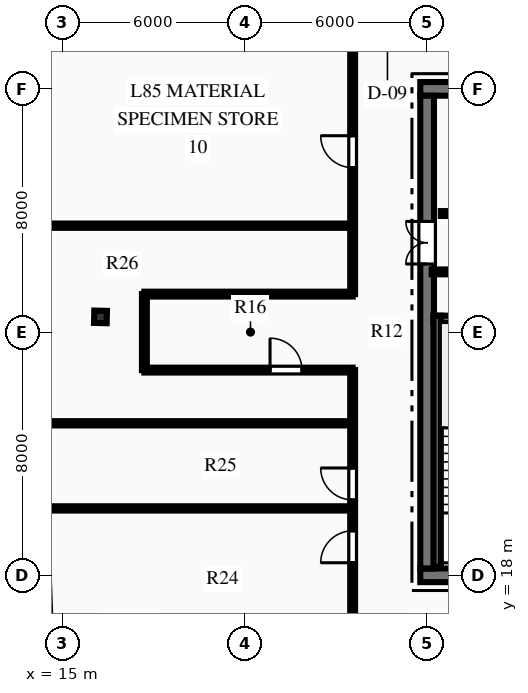
"""IFC4 building model, lengths in metres.
Left out: names, types, materials, properties, quantities, classifications, styles, units other than length and angle.
Written with IfcOpenShell. Run it as: python <this file> out.ifc"""

import sys

from ifc_helpers import new_model, si_unit, direction, frame, frame_2d, origin, origin_2d, place, context, subcontext, project, spatial, rectangle, i_section, extrude, element, fill, save


model = new_model("IFC4")
c1 = context("Model", 3, precision=1e-05, world=origin(), true_north=direction((0.0, 1.0)))
c2 = subcontext(c1, "Body", "Model", "MODEL_VIEW")
j1 = project(units=[si_unit("LENGTHUNIT", "METRE"), si_unit("PLANEANGLEUNIT", "RADIAN")], contexts=[c1])
p1 = place(None, origin())
s1 = spatial("IfcSite", under=j1, at=p1, CompositionType="ELEMENT")
p2 = place(p1, origin())
s2 = spatial("IfcBuilding", under=s1, at=p2, CompositionType="ELEMENT")
p3 = place(p2, frame((0.0, 0.0, 336.45)))
s3 = spatial("IfcBuildingStorey", under=s2, at=p3, CompositionType="ELEMENT", Elevation=336.45)
p4 = place(p3, frame((26.775, 18.0, 0.0), z_axis=(0.0, 0.0, 1.0), x_axis=(1.0, 0.0, 0.0)))
e1 = element("IfcWall", 1, at=p4, inside=s3, PredefinedType="SHEAR", context=c2, shape_type="SweptSolid", body=[
    extrude(rectangle(XDim=18.45, YDim=0.45, at=frame_2d((9.225, 0.0))), origin(), (0.0, 0.0, 1.0), 3.75),
])
p5 = place(p4, frame((7.325, 0.0, 0.0)))
e2 = element("IfcOpeningElement", 2, at=p5, cuts=e1, PredefinedType="OPENING", context=c2, shape_type="SweptSolid", body=[
    extrude(rectangle(XDim=1.1, YDim=2.15, at=frame_2d((0.55, 1.075))), frame((0.0, 0.235, 0.0), z_axis=(0.0, -1.0, 0.0), x_axis=(1.0, 0.0, 0.0)), (0.0, 0.0, 1.0), 0.47),
])
p6 = place(p4, frame((10.025, 0.0, 0.0)))
e3 = element("IfcOpeningElement", 3, at=p6, cuts=e1, PredefinedType="OPENING", context=c2, shape_type="SweptSolid", body=[
    extrude(rectangle(XDim=1.1, YDim=2.15, at=frame_2d((0.55, 1.075))), frame((0.0, 0.235, 0.0), z_axis=(0.0, -1.0, 0.0), x_axis=(1.0, 0.0, 0.0)), (0.0, 0.0, 1.0), 0.47),
])
p7 = place(p3, frame((26.775, 34.0, 0.0), z_axis=(0.0, 0.0, 1.0), x_axis=(1.0, 0.0, 0.0)))
e4 = element("IfcWall", 4, at=p7, inside=s3, PredefinedType="SHEAR", context=c2, shape_type="SweptSolid", body=[
    extrude(rectangle(XDim=18.45, YDim=0.45, at=frame_2d((9.225, 0.0))), origin(), (0.0, 0.0, 1.0), 3.75),
])
p8 = place(p3, frame((27.0, 18.225, 0.0), z_axis=(0.0, 0.0, 1.0), x_axis=(0.0, 1.0, 0.0)))
e5 = element("IfcWall", 5, at=p8, inside=s3, PredefinedType="SHEAR", context=c2, shape_type="SweptSolid", body=[
    extrude(rectangle(XDim=15.55, YDim=0.45, at=frame_2d((7.775, 0.0))), origin(), (0.0, 0.0, 1.0), 3.75),
])
p9 = place(p8, frame((10.015, 0.0, 0.0)))
e6 = element("IfcOpeningElement", 6, at=p9, cuts=e5, PredefinedType="OPENING", context=c2, shape_type="SweptSolid", body=[
    extrude(rectangle(XDim=1.4, YDim=2.2, at=frame_2d((0.7, 1.1))), frame((0.0, 0.235, 0.0), z_axis=(0.0, -1.0, 0.0), x_axis=(1.0, 0.0, 0.0)), (0.0, 0.0, 1.0), 0.47),
])
p10 = place(p3, frame((27.21, 26.42, 0.0), z_axis=(0.0, 0.0, 1.0), x_axis=(1.0, 0.0, 0.0)))
e7 = element("IfcWall", 7, at=p10, inside=s3, PredefinedType="SHEAR", context=c2, shape_type="SweptSolid", body=[
    extrude(rectangle(XDim=3.98, YDim=0.24, at=frame_2d((1.99, 0.0))), origin(), (0.0, 0.0, 1.0), 3.75),
])
p11 = place(p3, frame((27.33, 18.28, 0.0), z_axis=(0.0, 0.0, 1.0), x_axis=(0.0, 1.0, 0.0)))
e8 = element("IfcWall", 8, at=p11, inside=s3, PredefinedType="SHEAR", context=c2, shape_type="SweptSolid", body=[
    extrude(rectangle(XDim=8.26, YDim=0.24, at=frame_2d((4.13, 0.0))), origin(), (0.0, 0.0, 1.0), 3.75),
])
p12 = place(p3, frame((16.256, 26.5, 0.0), z_axis=(0.0, 0.0, 1.0), x_axis=(0.025304572866, 0.999679788028, 0.0)))
e9 = element("IfcColumn", 9, at=p12, inside=s3, PredefinedType="COLUMN", context=c2, shape_type="SweptSolid", body=[
    extrude(i_section(OverallWidth=0.406, OverallDepth=0.416, WebThickness=0.03, FlangeThickness=0.048, at=origin_2d()), origin(), (0.0, 0.0, 1.0), 3.75),
])
p13 = place(p3, frame((27.15, 27.98, 0.0), z_axis=(0.0, 0.0, 1.0), x_axis=(1.0, 0.0, 0.0)))
e10 = element("IfcWall", 10, at=p13, inside=s3, PredefinedType="PARTITIONING", context=c2, shape_type="SweptSolid", body=[
    extrude(rectangle(XDim=4.05, YDim=0.16, at=frame_2d((2.025, 0.0))), origin(), (0.0, 0.0, 1.0), 3.49),
])
p14 = place(p13, frame((1.625, 0.0, 0.0)))
e11 = element("IfcOpeningElement", 11, at=p14, cuts=e10, PredefinedType="OPENING", context=c2, shape_type="SweptSolid", body=[
    extrude(rectangle(XDim=0.95, YDim=2.15, at=frame_2d((0.475, 1.075))), frame((0.0, 0.09, 0.0), z_axis=(0.0, -1.0, 0.0), x_axis=(1.0, 0.0, 0.0)), (0.0, 0.0, 1.0), 0.18),
])
p15 = place(p3, frame((27.45, 29.9, 0.0), z_axis=(0.0, 0.0, 1.0), x_axis=(1.0, 0.0, 0.0)))
e12 = element("IfcWall", 12, at=p15, inside=s3, PredefinedType="PARTITIONING", context=c2, shape_type="SweptSolid", body=[
    extrude(rectangle(XDim=4.43, YDim=0.16, at=frame_2d((2.215, 0.0))), origin(), (0.0, 0.0, 1.0), 3.49),
])
p16 = place(p15, frame((1.675, 0.0, 0.0)))
e13 = element("IfcOpeningElement", 13, at=p16, cuts=e12, PredefinedType="OPENING", context=c2, shape_type="SweptSolid", body=[
    extrude(rectangle(XDim=0.95, YDim=2.15, at=frame_2d((0.475, 1.075))), frame((0.0, 0.09, 0.0), z_axis=(0.0, -1.0, 0.0), x_axis=(1.0, 0.0, 0.0)), (0.0, 0.0, 1.0), 0.18),
])
p17 = place(p3, frame((24.55, 15.55, 0.0), z_axis=(0.0, 0.0, 1.0), x_axis=(0.0, 1.0, 0.0)))
e14 = element("IfcWall", 14, at=p17, inside=s3, PredefinedType="PARTITIONING", context=c2, shape_type="SweptSolid", body=[
    extrude(rectangle(XDim=9.2, YDim=0.16, at=frame_2d((4.6, 0.0))), origin(), (0.0, 0.0, 1.0), 3.49),
])
p18 = place(p17, frame((2.863, 0.0, 0.0)))
e15 = element("IfcOpeningElement", 15, at=p18, cuts=e14, PredefinedType="OPENING", context=c2, shape_type="SweptSolid", body=[
    extrude(rectangle(XDim=1.05, YDim=2.15, at=frame_2d((0.525, 1.075))), frame((0.0, 0.09, 0.0), z_axis=(0.0, -1.0, 0.0), x_axis=(1.0, 0.0, 0.0)), (0.0, 0.0, 1.0), 0.18),
])
p19 = place(p17, frame((4.93, 0.0, 0.0)))
e16 = element("IfcOpeningElement", 16, at=p19, cuts=e14, PredefinedType="OPENING", context=c2, shape_type="SweptSolid", body=[
    extrude(rectangle(XDim=1.05, YDim=2.15, at=frame_2d((0.525, 1.075))), frame((0.0, 0.09, 0.0), z_axis=(0.0, -1.0, 0.0), x_axis=(1.0, 0.0, 0.0)), (0.0, 0.0, 1.0), 0.18),
])
p20 = place(p3, frame((24.55, 27.25, 0.0), z_axis=(0.0, 0.0, 1.0), x_axis=(0.0, 1.0, 0.0)))
e17 = element("IfcWall", 17, at=p20, inside=s3, PredefinedType="PARTITIONING", context=c2, shape_type="SweptSolid", body=[
    extrude(rectangle(XDim=9.2, YDim=0.16, at=frame_2d((4.6, 0.0))), origin(), (0.0, 0.0, 1.0), 3.49),
])
p21 = place(p20, frame((4.16, 0.0, 0.0)))
e18 = element("IfcOpeningElement", 18, at=p21, cuts=e17, PredefinedType="OPENING", context=c2, shape_type="SweptSolid", body=[
    extrude(rectangle(XDim=1.05, YDim=2.15, at=frame_2d((0.525, 1.075))), frame((0.0, 0.09, 0.0), z_axis=(0.0, -1.0, 0.0), x_axis=(1.0, 0.0, 0.0)), (0.0, 0.0, 1.0), 0.18),
])
p22 = place(p3, frame((17.7, 24.75, 0.0), z_axis=(0.0, 0.0, 1.0), x_axis=(1.0, 0.0, 0.0)))
e19 = element("IfcWall", 19, at=p22, inside=s3, PredefinedType="PARTITIONING", context=c2, shape_type="SweptSolid", body=[
    extrude(rectangle(XDim=6.85, YDim=0.16, at=frame_2d((3.425, 0.0))), origin(), (0.0, 0.0, 1.0), 3.49),
])
p23 = place(p22, frame((4.133, 0.0, 0.0)))
e20 = element("IfcOpeningElement", 20, at=p23, cuts=e19, PredefinedType="OPENING", context=c2, shape_type="SweptSolid", body=[
    extrude(rectangle(XDim=1.05, YDim=2.15, at=frame_2d((0.525, 1.075))), frame((0.0, 0.09, 0.0), z_axis=(0.0, -1.0, 0.0), x_axis=(1.0, 0.0, 0.0)), (0.0, 0.0, 1.0), 0.18),
])
p24 = place(p3, frame((17.7, 27.25, 0.0), z_axis=(0.0, 0.0, 1.0), x_axis=(1.0, 0.0, 0.0)))
e21 = element("IfcWall", 21, at=p24, inside=s3, PredefinedType="PARTITIONING", context=c2, shape_type="SweptSolid", body=[
    extrude(rectangle(XDim=6.85, YDim=0.16, at=frame_2d((3.425, 0.0))), origin(), (0.0, 0.0, 1.0), 3.49),
])
p25 = place(p3, frame((17.7, 24.75, 0.0), z_axis=(0.0, 0.0, 1.0), x_axis=(0.0, 1.0, 0.0)))
e22 = element("IfcWall", 22, at=p25, inside=s3, PredefinedType="PARTITIONING", context=c2, shape_type="SweptSolid", body=[
    extrude(rectangle(XDim=2.5, YDim=0.16, at=frame_2d((1.25, 0.0))), origin(), (0.0, 0.0, 1.0), 3.49),
])
p26 = place(p3, frame((14.279, 20.2, 0.0), z_axis=(0.0, 0.0, 1.0), x_axis=(1.0, 0.0, 0.0)))
e23 = element("IfcWall", 23, at=p26, inside=s3, PredefinedType="PARTITIONING", context=c2, shape_type="SweptSolid", body=[
    extrude(rectangle(XDim=10.271, YDim=0.14, at=frame_2d((5.135, 0.0))), origin(), (0.0, 0.0, 1.0), 3.49),
])
p27 = place(p3, frame((14.181, 23.0, 0.0), z_axis=(0.0, 0.0, 1.0), x_axis=(1.0, 0.0, 0.0)))
e24 = element("IfcWall", 24, at=p27, inside=s3, PredefinedType="PARTITIONING", context=c2, shape_type="SweptSolid", body=[
    extrude(rectangle(XDim=10.369, YDim=0.14, at=frame_2d((5.184, 0.0))), origin(), (0.0, 0.0, 1.0), 3.49),
])
p28 = place(p3, frame((13.954, 29.5, 0.0), z_axis=(0.0, 0.0, 1.0), x_axis=(1.0, 0.0, 0.0)))
e25 = element("IfcWall", 25, at=p28, inside=s3, PredefinedType="PARTITIONING", context=c2, shape_type="SweptSolid", body=[
    extrude(rectangle(XDim=10.596, YDim=0.14, at=frame_2d((5.298, 0.0))), origin(), (0.0, 0.0, 1.0), 3.49),
])
p29 = place(p9, origin())
e26 = element("IfcDoor", 26, at=p29, inside=s3, OperationType="DOUBLE_DOOR_SINGLE_SWING", PredefinedType="DOOR", context=c2, shape_type="SweptSolid", body=[
    extrude(rectangle(XDim=1.4, YDim=2.2, at=frame_2d((0.7, 1.1))), frame((0.0, 0.025, 0.0), z_axis=(0.0, -1.0, 0.0), x_axis=(1.0, 0.0, 0.0)), (0.0, 0.0, 1.0), 0.05),
])
fill(e6, e26)
p30 = place(p18, origin())
e27 = element("IfcDoor", 27, at=p30, inside=s3, OperationType="SINGLE_SWING_LEFT", PredefinedType="DOOR", context=c2, shape_type="SweptSolid", body=[
    extrude(rectangle(XDim=1.05, YDim=2.15, at=frame_2d((0.525, 1.075))), frame((0.0, 0.025, 0.0), z_axis=(0.0, -1.0, 0.0), x_axis=(1.0, 0.0, 0.0)), (0.0, 0.0, 1.0), 0.05),
])
fill(e15, e27)
p31 = place(p19, origin())
e28 = element("IfcDoor", 28, at=p31, inside=s3, OperationType="SINGLE_SWING_RIGHT", PredefinedType="DOOR", context=c2, shape_type="SweptSolid", body=[
    extrude(rectangle(XDim=1.05, YDim=2.15, at=frame_2d((0.525, 1.075))), frame((0.0, 0.025, 0.0), z_axis=(0.0, -1.0, 0.0), x_axis=(1.0, 0.0, 0.0)), (0.0, 0.0, 1.0), 0.05),
])
fill(e16, e28)
p32 = place(p23, origin())
e29 = element("IfcDoor", 29, at=p32, inside=s3, OperationType="SINGLE_SWING_LEFT", PredefinedType="DOOR", context=c2, shape_type="SweptSolid", body=[
    extrude(rectangle(XDim=1.05, YDim=2.15, at=frame_2d((0.525, 1.075))), frame((0.0, 0.025, 0.0), z_axis=(0.0, -1.0, 0.0), x_axis=(1.0, 0.0, 0.0)), (0.0, 0.0, 1.0), 0.05),
])
fill(e20, e29)
p33 = place(p21, origin())
e30 = element("IfcDoor", 30, at=p33, inside=s3, OperationType="SINGLE_SWING_RIGHT", PredefinedType="DOOR", context=c2, shape_type="SweptSolid", body=[
    extrude(rectangle(XDim=1.05, YDim=2.15, at=frame_2d((0.525, 1.075))), frame((0.0, 0.025, 0.0), z_axis=(0.0, -1.0, 0.0), x_axis=(1.0, 0.0, 0.0)), (0.0, 0.0, 1.0), 0.05),
])
fill(e18, e30)
save(model, sys.argv[1])
